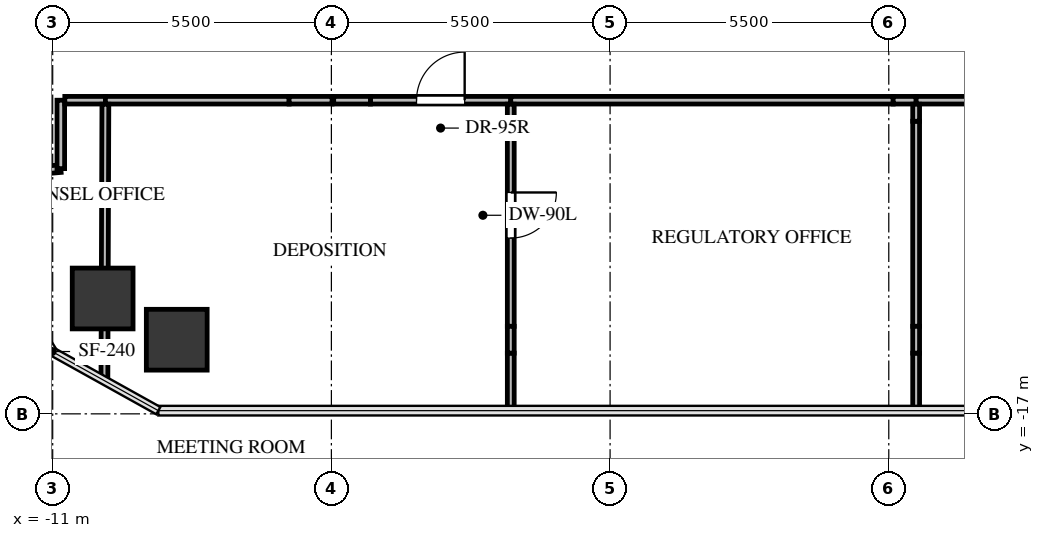
"""IFC4 building model, lengths in metres.
Left out: names, types, materials, properties, quantities, classifications, styles, units other than length and angle.
Written with IfcOpenShell. Run it as: python <this file> out.ifc"""

import sys

from ifc_helpers import new_model, si_unit, direction, frame, frame_2d, origin, origin_2d, place, context, subcontext, project, spatial, rectangle, extrude, source, transform, mapped, element, fill, save


model = new_model("IFC4")
c1 = context("Model", 3, precision=1e-05, world=origin(), true_north=direction((0.0, 1.0)))
c2 = subcontext(c1, "Body", "Model", "MODEL_VIEW")
j1 = project(units=[si_unit("LENGTHUNIT", "METRE"), si_unit("PLANEANGLEUNIT", "RADIAN")], contexts=[c1])
p1 = place(None, origin())
s1 = spatial("IfcSite", under=j1, at=p1, CompositionType="ELEMENT")
p2 = place(p1, origin())
s2 = spatial("IfcBuilding", under=s1, at=p2, CompositionType="ELEMENT")
p3 = place(p2, frame((0.0, 0.0, 140.1)))
s3 = spatial("IfcBuildingStorey", under=s2, at=p3, CompositionType="ELEMENT", Elevation=140.1)
m1 = source(origin(), c2, "Body", "SweptSolid", [
    extrude(rectangle(XDim=1.2, YDim=1.2, at=origin_2d()), origin(), (0.0, 0.0, 1.0), 3.0),
])
for number, where, z_axis, x_axis in (
    (1, (-10.014, -14.723, -0.24), (0.0, 0.0, 1.0), (1.0, 0.0, 0.0)),
    (2, (-8.552, -15.537, -0.24), (0.0, 0.0, 1.0), (1.0, 0.0, 0.0)),
):
    element("IfcColumn", number, at=place(p3, frame(where, z_axis=z_axis, x_axis=x_axis)), inside=s3, PredefinedType="COLUMN", context=c2, shape_type="MappedRepresentation", body=[
        mapped(m1, transform((0.0, 0.0, 0.0), x_axis=(1.0, 0.0, 0.0), y_axis=(0.0, 1.0, 0.0), z_axis=(0.0, 0.0, 1.0), scale=1.0)),
    ])
p4 = place(p3, frame((-11.27, -12.197, 0.0), z_axis=(0.0, 0.0, 1.0), x_axis=(0.996291394281, 0.086043347688, 0.0)))
e3 = element("IfcWall", 3, at=p4, inside=s3, PredefinedType="PARTITIONING", context=c2, shape_type="SweptSolid", body=[
    extrude(rectangle(XDim=0.431, YDim=0.15, at=frame_2d((0.216, 0.0))), origin(), (0.0, 0.0, 1.0), 2.745),
])
p5 = place(p3, frame((-10.84, -12.16, 0.0), z_axis=(0.0, 0.0, 1.0), x_axis=(0.0, 1.0, 0.0)))
e4 = element("IfcWall", 4, at=p5, inside=s3, PredefinedType="PARTITIONING", context=c2, shape_type="SweptSolid", body=[
    extrude(rectangle(XDim=1.35, YDim=0.15, at=frame_2d((0.675, 0.0))), origin(), (0.0, 0.0, 1.0), 2.745),
])
p6 = place(p3, frame((-10.761, -10.81, 0.0), z_axis=(0.0, 0.0, 1.0), x_axis=(1.0, 0.0, 0.0)))
e5 = element("IfcWall", 5, at=p6, inside=s3, PredefinedType="PARTITIONING", context=c2, shape_type="SweptSolid", body=[
    extrude(rectangle(XDim=0.801, YDim=0.15, at=frame_2d((0.4, 0.0))), origin(), (0.0, 0.0, 1.0), 2.745),
])
p7 = place(p3, frame((-9.96, -10.81, 0.0), z_axis=(0.0, 0.0, 1.0), x_axis=(1.0, 0.0, 0.0)))
e6 = element("IfcWall", 6, at=p7, inside=s3, PredefinedType="PARTITIONING", context=c2, shape_type="SweptSolid", body=[
    extrude(rectangle(XDim=3.625, YDim=0.15, at=frame_2d((1.813, 0.0))), origin(), (0.0, 0.0, 1.0), 1.912),
])
p8 = place(p3, frame((-4.729, -10.81, 0.0), z_axis=(0.0, 0.0, 1.0), x_axis=(1.0, 0.0, 0.0)))
e7 = element("IfcWall", 7, at=p8, inside=s3, PredefinedType="PARTITIONING", context=c2, shape_type="SweptSolid", body=[
    extrude(rectangle(XDim=2.77, YDim=0.15, at=frame_2d((1.385, 0.0))), origin(), (0.0, 0.0, 1.0), 2.745),
])
p9 = place(p8, frame((0.91, 0.0, 0.0)))
e8 = element("IfcOpeningElement", 8, at=p9, cuts=e7, PredefinedType="OPENING", context=c2, shape_type="SweptSolid", body=[
    extrude(rectangle(XDim=0.95, YDim=2.1, at=frame_2d((0.475, 1.05))), frame((0.0, 0.085, 0.0), z_axis=(0.0, -1.0, 0.0), x_axis=(1.0, 0.0, 0.0)), (0.0, 0.0, 1.0), 0.17),
])
p10 = place(p3, frame((-6.334, -10.81, 0.0), z_axis=(0.0, 0.0, 1.0), x_axis=(1.0, 0.0, 0.0)))
e9 = element("IfcWall", 9, at=p10, inside=s3, PredefinedType="PARTITIONING", context=c2, shape_type="SweptSolid", body=[
    extrude(rectangle(XDim=0.848, YDim=0.15, at=frame_2d((0.424, 0.0))), origin(), (0.0, 0.0, 1.0), 1.912),
])
p11 = place(p3, frame((-5.455, -10.81, 0.0), z_axis=(0.0, 0.0, 1.0), x_axis=(1.0, 0.0, 0.0)))
e10 = element("IfcWall", 10, at=p11, inside=s3, PredefinedType="PARTITIONING", context=c2, shape_type="SweptSolid", body=[
    extrude(rectangle(XDim=0.725, YDim=0.15, at=frame_2d((0.363, 0.0))), origin(), (0.0, 0.0, 1.0), 1.912),
])
p12 = place(p3, frame((-1.96, -10.81, 0.0), z_axis=(0.0, 0.0, 1.0), x_axis=(1.0, 0.0, 0.0)))
e11 = element("IfcWall", 11, at=p12, inside=s3, PredefinedType="PARTITIONING", context=c2, shape_type="SweptSolid", body=[
    extrude(rectangle(XDim=7.547, YDim=0.15, at=frame_2d((3.773, 0.0))), origin(), (0.0, 0.0, 1.0), 1.912),
])
p13 = place(p3, frame((5.587, -10.81, 0.0), z_axis=(0.0, 0.0, 1.0), x_axis=(1.0, 0.0, 0.0)))
e12 = element("IfcWall", 12, at=p13, inside=s3, PredefinedType="PARTITIONING", context=c2, shape_type="SweptSolid", body=[
    extrude(rectangle(XDim=0.453, YDim=0.15, at=frame_2d((0.227, 0.0))), origin(), (0.0, 0.0, 1.0), 1.912),
])
p14 = place(p3, frame((6.04, -10.81, 0.0), z_axis=(0.0, 0.0, 1.0), x_axis=(1.0, 0.0, 0.0)))
e13 = element("IfcWall", 13, at=p14, inside=s3, PredefinedType="PARTITIONING", context=c2, shape_type="SweptSolid", body=[
    extrude(rectangle(XDim=1.444, YDim=0.15, at=frame_2d((0.722, 0.0))), origin(), (0.0, 0.0, 1.0), 1.912),
])
p15 = place(p3, frame((-9.96, -10.889, 0.0), z_axis=(0.0, 0.0, 1.0), x_axis=(-0.003528457908, -0.999993774973, 0.0)))
e14 = element("IfcWall", 14, at=p15, inside=s3, PredefinedType="PARTITIONING", context=c2, shape_type="SweptSolid", body=[
    extrude(rectangle(XDim=3.39, YDim=0.135, at=frame_2d((1.695, 0.0))), origin(), (0.0, 0.0, 1.0), 1.912),
])
p16 = place(p3, frame((-9.975, -15.048, 0.0), z_axis=(0.0, 0.0, 1.0), x_axis=(-0.003576784349, -0.999993603286, 0.0)))
e15 = element("IfcWall", 15, at=p16, inside=s3, PredefinedType="PARTITIONING", context=c2, shape_type="SweptSolid", body=[
    extrude(rectangle(XDim=1.297, YDim=0.135, at=frame_2d((0.648, 0.0))), origin(), (0.0, 0.0, 1.0), 2.745),
])
p17 = place(p3, frame((-9.972, -14.279, 0.0), z_axis=(0.0, 0.0, 1.0), x_axis=(-0.003494260751, -0.999993895052, 0.0)))
e16 = element("IfcWall", 16, at=p17, inside=s3, PredefinedType="PARTITIONING", context=c2, shape_type="SweptSolid", body=[
    extrude(rectangle(XDim=0.769, YDim=0.135, at=frame_2d((0.384, 0.0))), origin(), (0.0, 0.0, 1.0), 1.577),
])
p18 = place(p3, frame((-1.96, -10.889, 0.0), z_axis=(0.0, 0.0, 1.0), x_axis=(0.0, -1.0, 0.0)))
e17 = element("IfcWall", 17, at=p18, inside=s3, PredefinedType="PARTITIONING", context=c2, shape_type="SweptSolid", body=[
    extrude(rectangle(XDim=4.384, YDim=0.135, at=frame_2d((2.192, 0.0))), origin(), (0.0, 0.0, 1.0), 2.745),
])
p19 = place(p18, frame((1.742, 0.0, 0.0)))
e18 = element("IfcOpeningElement", 18, at=p19, cuts=e17, PredefinedType="OPENING", context=c2, shape_type="SweptSolid", body=[
    extrude(rectangle(XDim=0.9, YDim=2.05, at=frame_2d((0.45, 1.025))), frame((0.0, 0.078, 0.0), z_axis=(0.0, -1.0, 0.0), x_axis=(1.0, 0.0, 0.0)), (0.0, 0.0, 1.0), 0.155),
])
p20 = place(p3, frame((-1.96, -15.802, 0.0), z_axis=(0.0, 0.0, 1.0), x_axis=(0.0, -1.0, 0.0)))
e19 = element("IfcWall", 19, at=p20, inside=s3, PredefinedType="PARTITIONING", context=c2, shape_type="SweptSolid", body=[
    extrude(rectangle(XDim=1.135, YDim=0.135, at=frame_2d((0.568, 0.0))), origin(), (0.0, 0.0, 1.0), 2.745),
])
p21 = place(p3, frame((-1.96, -15.272, 0.0), z_axis=(0.0, 0.0, 1.0), x_axis=(0.0, -1.0, 0.0)))
e20 = element("IfcWall", 20, at=p21, inside=s3, PredefinedType="PARTITIONING", context=c2, shape_type="SweptSolid", body=[
    extrude(rectangle(XDim=0.529, YDim=0.135, at=frame_2d((0.265, 0.0))), origin(), (0.0, 0.0, 1.0), 2.08),
])
p22 = place(p3, frame((6.04, -11.225, 0.0), z_axis=(0.0, 0.0, 1.0), x_axis=(0.0, -1.0, 0.0)))
e21 = element("IfcWall", 21, at=p22, inside=s3, PredefinedType="PARTITIONING", context=c2, shape_type="SweptSolid", body=[
    extrude(rectangle(XDim=4.047, YDim=0.135, at=frame_2d((2.023, 0.0))), origin(), (0.0, 0.0, 1.0), 2.745),
])
p23 = place(p3, frame((6.04, -15.802, 0.0), z_axis=(0.0, 0.0, 1.0), x_axis=(0.0, -1.0, 0.0)))
e22 = element("IfcWall", 22, at=p23, inside=s3, PredefinedType="PARTITIONING", context=c2, shape_type="SweptSolid", body=[
    extrude(rectangle(XDim=1.135, YDim=0.135, at=frame_2d((0.568, 0.0))), origin(), (0.0, 0.0, 1.0), 2.745),
])
p24 = place(p3, frame((6.04, -10.889, 0.0), z_axis=(0.0, 0.0, 1.0), x_axis=(0.0, -1.0, 0.0)))
e23 = element("IfcWall", 23, at=p24, inside=s3, PredefinedType="PARTITIONING", context=c2, shape_type="SweptSolid", body=[
    extrude(rectangle(XDim=0.336, YDim=0.135, at=frame_2d((0.168, 0.0))), origin(), (0.0, 0.0, 1.0), 1.912),
])
p25 = place(p3, frame((6.04, -15.272, 0.0), z_axis=(0.0, 0.0, 1.0), x_axis=(0.0, -1.0, 0.0)))
e24 = element("IfcWall", 24, at=p25, inside=s3, PredefinedType="PARTITIONING", context=c2, shape_type="SweptSolid", body=[
    extrude(rectangle(XDim=0.529, YDim=0.135, at=frame_2d((0.265, 0.0))), origin(), (0.0, 0.0, 1.0), 2.08),
])
m2 = source(origin(), c2, "Body", "SweptSolid", [
    extrude(rectangle(XDim=0.95, YDim=2.1, at=frame_2d((0.475, 1.05))), frame((0.0, 0.025, 0.0), z_axis=(0.0, -1.0, 0.0), x_axis=(1.0, 0.0, 0.0)), (0.0, 0.0, 1.0), 0.05),
])
p26 = place(p9, origin())
e25 = element("IfcDoor", 25, at=p26, inside=s3, OperationType="SINGLE_SWING_RIGHT", PredefinedType="DOOR", context=c2, shape_type="MappedRepresentation", body=[
    mapped(m2, transform((0.0, 0.0, 0.0), x_axis=(1.0, 0.0, 0.0), y_axis=(0.0, 1.0, 0.0), z_axis=(0.0, 0.0, 1.0), scale=1.0)),
])
fill(e8, e25)
m3 = source(origin(), c2, "Body", "SweptSolid", [
    extrude(rectangle(XDim=0.9, YDim=2.05, at=frame_2d((0.45, 1.025))), frame((0.0, 0.025, 0.0), z_axis=(0.0, -1.0, 0.0), x_axis=(1.0, 0.0, 0.0)), (0.0, 0.0, 1.0), 0.05),
])
p27 = place(p19, origin())
e26 = element("IfcDoor", 26, at=p27, inside=s3, OperationType="SINGLE_SWING_LEFT", PredefinedType="DOOR", context=c2, shape_type="MappedRepresentation", body=[
    mapped(m3, transform((0.0, 0.0, 0.0), x_axis=(1.0, 0.0, 0.0), y_axis=(0.0, 1.0, 0.0), z_axis=(0.0, 0.0, 1.0), scale=1.0)),
])
fill(e18, e26)
save(model, sys.argv[1])
